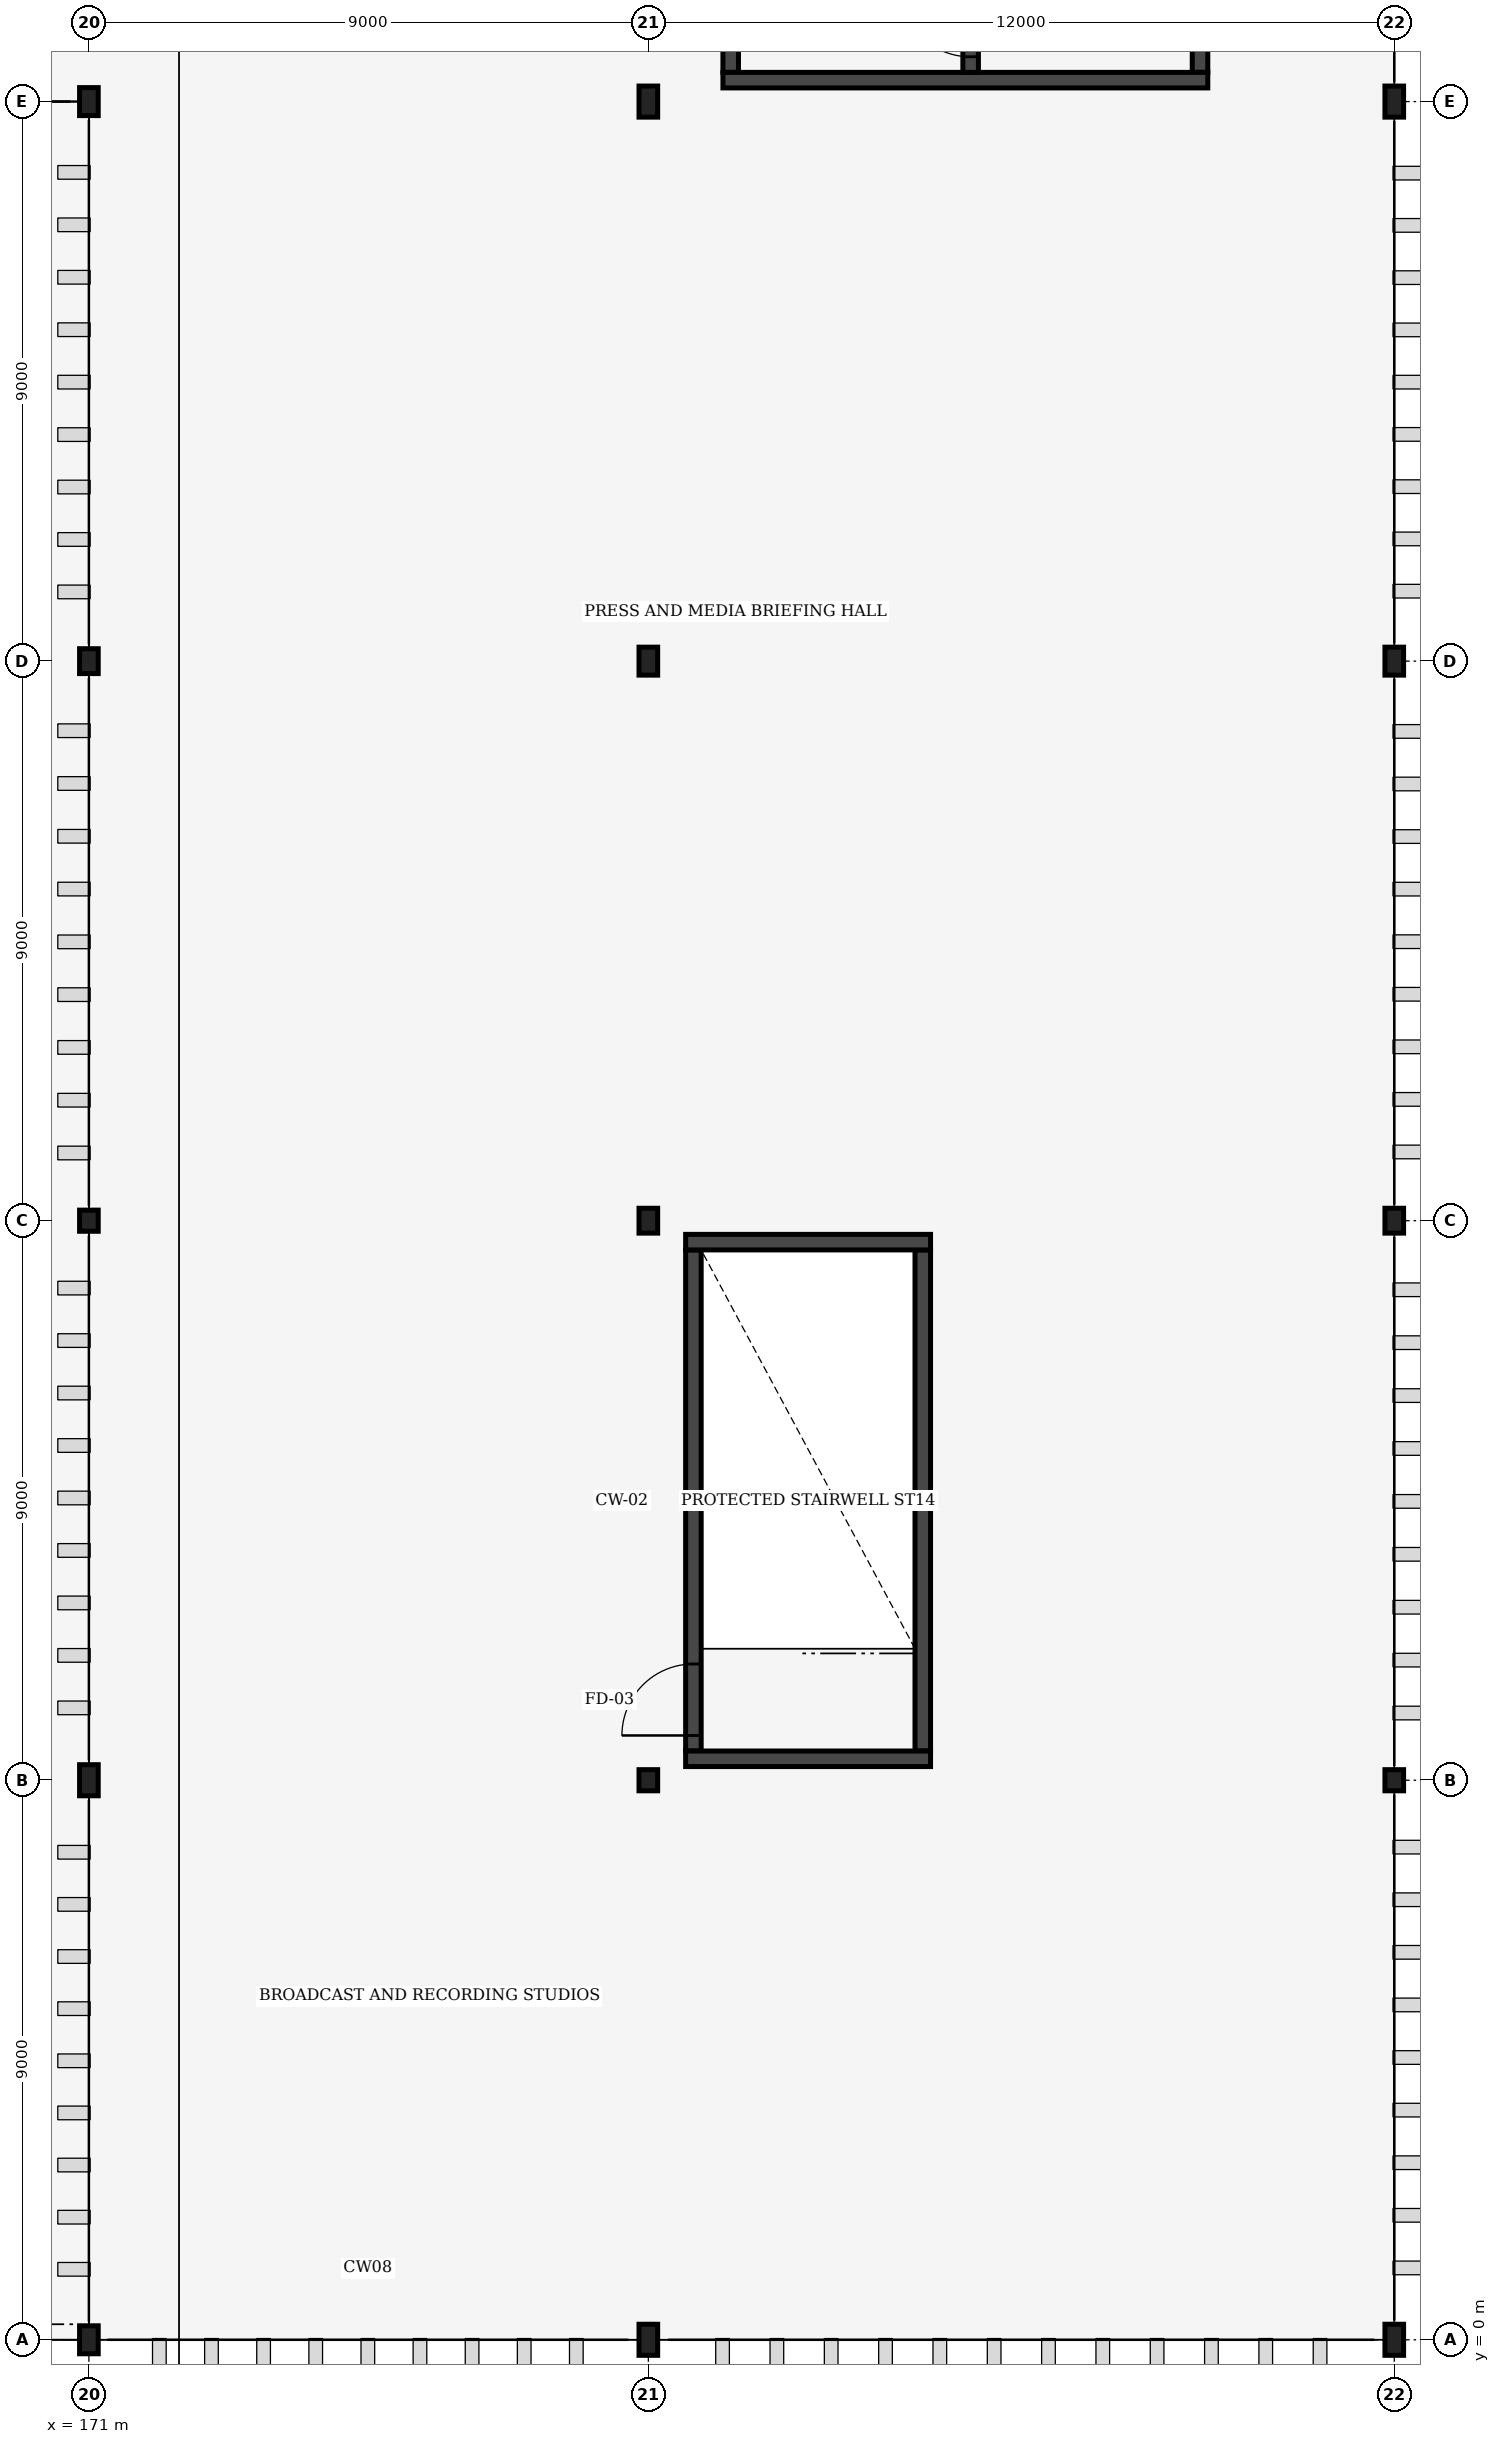
"""IFC4 building model, lengths in metres.
Left out: names, types, materials, properties, quantities, classifications, styles, units other than length and angle.
Written with IfcOpenShell. Run it as: python <this file> out.ifc"""

import sys

from ifc_helpers import new_model, si_unit, direction, frame, frame_2d, origin, origin_2d, place, context, subcontext, project, spatial, rectangle, i_section, extrude, element, fill, save


model = new_model("IFC4")
c1 = context("Model", 3, precision=1e-05, world=origin(), true_north=direction((0.0, 1.0)))
c2 = subcontext(c1, "Body", "Model", "MODEL_VIEW")
j1 = project(units=[si_unit("LENGTHUNIT", "METRE"), si_unit("PLANEANGLEUNIT", "RADIAN")], contexts=[c1])
p1 = place(None, origin())
s1 = spatial("IfcSite", under=j1, at=p1, CompositionType="ELEMENT")
p2 = place(p1, origin())
s2 = spatial("IfcBuilding", under=s1, at=p2, CompositionType="ELEMENT")
p3 = place(p2, frame((0.0, 0.0, 18.0)))
s3 = spatial("IfcBuildingStorey", under=s2, at=p3, CompositionType="ELEMENT", Elevation=18.0)
p4 = place(p3, frame((171.0, 0.0, 0.0), z_axis=(0.0, 0.0, 1.0), x_axis=(1.0, 0.0, 0.0)))
e1 = element("IfcColumn", 1, at=p4, inside=s3, PredefinedType="COLUMN", context=c2, shape_type="SweptSolid", body=[
    extrude(i_section(OverallWidth=0.3, OverallDepth=0.45, WebThickness=0.014, FlangeThickness=0.026, FilletRadius=0.027, at=origin_2d()), origin(), (0.0, 0.0, 1.0), 4.8),
])
p5 = place(p3, frame((171.0, 9.0, 0.0), z_axis=(0.0, 0.0, 1.0), x_axis=(1.0, 0.0, 0.0)))
e2 = element("IfcColumn", 2, at=p5, inside=s3, PredefinedType="COLUMN", context=c2, shape_type="SweptSolid", body=[
    extrude(i_section(OverallWidth=0.3, OverallDepth=0.5, WebThickness=0.014, FlangeThickness=0.028, FilletRadius=0.027, at=origin_2d()), origin(), (0.0, 0.0, 1.0), 4.8),
])
p6 = place(p3, frame((171.0, 18.0, 0.0), z_axis=(0.0, 0.0, 1.0), x_axis=(1.0, 0.0, 0.0)))
e3 = element("IfcColumn", 3, at=p6, inside=s3, PredefinedType="COLUMN", context=c2, shape_type="SweptSolid", body=[
    extrude(i_section(OverallWidth=0.3, OverallDepth=0.34, WebThickness=0.012, FlangeThickness=0.021, FilletRadius=0.027, at=origin_2d()), origin(), (0.0, 0.0, 1.0), 4.8),
])
p7 = place(p3, frame((171.0, 27.0, 0.0), z_axis=(0.0, 0.0, 1.0), x_axis=(1.0, 0.0, 0.0)))
e4 = element("IfcColumn", 4, at=p7, inside=s3, PredefinedType="COLUMN", context=c2, shape_type="SweptSolid", body=[
    extrude(i_section(OverallWidth=0.3, OverallDepth=0.4, WebThickness=0.013, FlangeThickness=0.024, FilletRadius=0.027, at=origin_2d()), origin(), (0.0, 0.0, 1.0), 4.8),
])
p8 = place(p3, frame((171.0, 36.0, 0.0), z_axis=(0.0, 0.0, 1.0), x_axis=(1.0, 0.0, 0.0)))
e5 = element("IfcColumn", 5, at=p8, inside=s3, PredefinedType="COLUMN", context=c2, shape_type="SweptSolid", body=[
    extrude(i_section(OverallWidth=0.3, OverallDepth=0.45, WebThickness=0.014, FlangeThickness=0.026, FilletRadius=0.027, at=origin_2d()), origin(), (0.0, 0.0, 1.0), 4.8),
])
p9 = place(p3, frame((180.0, 0.0, 0.0), z_axis=(0.0, 0.0, 1.0), x_axis=(1.0, 0.0, 0.0)))
e6 = element("IfcColumn", 6, at=p9, inside=s3, PredefinedType="COLUMN", context=c2, shape_type="SweptSolid", body=[
    extrude(i_section(OverallWidth=0.3, OverallDepth=0.5, WebThickness=0.014, FlangeThickness=0.028, FilletRadius=0.027, at=origin_2d()), origin(), (0.0, 0.0, 1.0), 4.8),
])
p10 = place(p3, frame((180.0, 9.0, 0.0), z_axis=(0.0, 0.0, 1.0), x_axis=(1.0, 0.0, 0.0)))
e7 = element("IfcColumn", 7, at=p10, inside=s3, PredefinedType="COLUMN", context=c2, shape_type="SweptSolid", body=[
    extrude(i_section(OverallWidth=0.3, OverallDepth=0.34, WebThickness=0.012, FlangeThickness=0.021, FilletRadius=0.027, at=origin_2d()), origin(), (0.0, 0.0, 1.0), 4.8),
])
p11 = place(p3, frame((180.0, 18.0, 0.0), z_axis=(0.0, 0.0, 1.0), x_axis=(1.0, 0.0, 0.0)))
e8 = element("IfcColumn", 8, at=p11, inside=s3, PredefinedType="COLUMN", context=c2, shape_type="SweptSolid", body=[
    extrude(i_section(OverallWidth=0.3, OverallDepth=0.4, WebThickness=0.013, FlangeThickness=0.024, FilletRadius=0.027, at=origin_2d()), origin(), (0.0, 0.0, 1.0), 4.8),
])
p12 = place(p3, frame((180.0, 27.0, 0.0), z_axis=(0.0, 0.0, 1.0), x_axis=(1.0, 0.0, 0.0)))
e9 = element("IfcColumn", 9, at=p12, inside=s3, PredefinedType="COLUMN", context=c2, shape_type="SweptSolid", body=[
    extrude(i_section(OverallWidth=0.3, OverallDepth=0.45, WebThickness=0.014, FlangeThickness=0.026, FilletRadius=0.027, at=origin_2d()), origin(), (0.0, 0.0, 1.0), 4.8),
])
for number, where, z_axis, x_axis in (
    (10, (180.0, 36.0, 0.0), (0.0, 0.0, 1.0), (1.0, 0.0, 0.0)),
    (11, (192.0, 0.0, 0.0), (0.0, 0.0, 1.0), (1.0, 0.0, 0.0)),
):
    element("IfcColumn", number, at=place(p3, frame(where, z_axis=z_axis, x_axis=x_axis)), inside=s3, PredefinedType="COLUMN", context=c2, shape_type="SweptSolid", body=[
        extrude(i_section(OverallWidth=0.3, OverallDepth=0.5, WebThickness=0.014, FlangeThickness=0.028, FilletRadius=0.027, at=origin_2d()), origin(), (0.0, 0.0, 1.0), 4.8),
    ])
p13 = place(p3, frame((192.0, 9.0, 0.0), z_axis=(0.0, 0.0, 1.0), x_axis=(1.0, 0.0, 0.0)))
e12 = element("IfcColumn", 12, at=p13, inside=s3, PredefinedType="COLUMN", context=c2, shape_type="SweptSolid", body=[
    extrude(i_section(OverallWidth=0.3, OverallDepth=0.34, WebThickness=0.012, FlangeThickness=0.021, FilletRadius=0.027, at=origin_2d()), origin(), (0.0, 0.0, 1.0), 4.8),
])
p14 = place(p3, frame((192.0, 18.0, 0.0), z_axis=(0.0, 0.0, 1.0), x_axis=(1.0, 0.0, 0.0)))
e13 = element("IfcColumn", 13, at=p14, inside=s3, PredefinedType="COLUMN", context=c2, shape_type="SweptSolid", body=[
    extrude(i_section(OverallWidth=0.3, OverallDepth=0.4, WebThickness=0.013, FlangeThickness=0.024, FilletRadius=0.027, at=origin_2d()), origin(), (0.0, 0.0, 1.0), 4.8),
])
p15 = place(p3, frame((192.0, 27.0, 0.0), z_axis=(0.0, 0.0, 1.0), x_axis=(1.0, 0.0, 0.0)))
e14 = element("IfcColumn", 14, at=p15, inside=s3, PredefinedType="COLUMN", context=c2, shape_type="SweptSolid", body=[
    extrude(i_section(OverallWidth=0.3, OverallDepth=0.45, WebThickness=0.014, FlangeThickness=0.026, FilletRadius=0.027, at=origin_2d()), origin(), (0.0, 0.0, 1.0), 4.8),
])
p16 = place(p3, frame((192.0, 36.0, 0.0), z_axis=(0.0, 0.0, 1.0), x_axis=(1.0, 0.0, 0.0)))
e15 = element("IfcColumn", 15, at=p16, inside=s3, PredefinedType="COLUMN", context=c2, shape_type="SweptSolid", body=[
    extrude(i_section(OverallWidth=0.3, OverallDepth=0.5, WebThickness=0.014, FlangeThickness=0.028, FilletRadius=0.027, at=origin_2d()), origin(), (0.0, 0.0, 1.0), 4.8),
])
p17 = place(p3, frame((181.325, 36.47, 0.0), z_axis=(0.0, 0.0, 1.0), x_axis=(0.0, 1.0, 0.0)))
e16 = element("IfcWall", 16, at=p17, inside=s3, PredefinedType="SHEAR", context=c2, shape_type="SweptSolid", body=[
    extrude(rectangle(XDim=8.06, YDim=0.25, at=frame_2d((4.03, 0.0))), origin(), (0.0, 0.0, 1.0), 4.45),
])
p18 = place(p17, frame((1.15, 0.0, 0.0)))
e17 = element("IfcOpeningElement", 17, at=p18, cuts=e16, PredefinedType="OPENING", context=c2, shape_type="SweptSolid", body=[
    extrude(rectangle(XDim=1.8, YDim=2.2, at=frame_2d((0.9, 1.1))), frame((0.0, 0.135, 0.0), z_axis=(0.0, -1.0, 0.0), x_axis=(1.0, 0.0, 0.0)), (0.0, 0.0, 1.0), 0.27),
])
p19 = place(p3, frame((188.875, 36.47, 0.0), z_axis=(0.0, 0.0, 1.0), x_axis=(0.0, 1.0, 0.0)))
e18 = element("IfcWall", 18, at=p19, inside=s3, PredefinedType="SHEAR", context=c2, shape_type="SweptSolid", body=[
    extrude(rectangle(XDim=8.06, YDim=0.25, at=frame_2d((4.03, 0.0))), origin(), (0.0, 0.0, 1.0), 4.45),
])
p20 = place(p3, frame((181.2, 36.345, 0.0), z_axis=(0.0, 0.0, 1.0), x_axis=(1.0, 0.0, 0.0)))
e19 = element("IfcWall", 19, at=p20, inside=s3, PredefinedType="SHEAR", context=c2, shape_type="SweptSolid", body=[
    extrude(rectangle(XDim=7.8, YDim=0.25, at=frame_2d((3.9, 0.0))), origin(), (0.0, 0.0, 1.0), 4.45),
])
p21 = place(p3, frame((185.185, 36.47, 0.0), z_axis=(0.0, 0.0, 1.0), x_axis=(0.0, 1.0, 0.0)))
e20 = element("IfcWall", 20, at=p21, inside=s3, PredefinedType="SHEAR", context=c2, shape_type="SweptSolid", body=[
    extrude(rectangle(XDim=8.06, YDim=0.25, at=frame_2d((4.03, 0.0))), origin(), (0.0, 0.0, 1.0), 4.45),
])
p22 = place(p21, frame((0.25, 0.0, 0.0)))
e21 = element("IfcOpeningElement", 21, at=p22, cuts=e20, PredefinedType="OPENING", context=c2, shape_type="SweptSolid", body=[
    extrude(rectangle(XDim=1.15, YDim=2.15, at=frame_2d((0.575, 1.075))), frame((0.0, 0.135, 0.0), z_axis=(0.0, -1.0, 0.0), x_axis=(1.0, 0.0, 0.0)), (0.0, 0.0, 1.0), 0.27),
])
p23 = place(p3, frame((180.725, 9.47, 0.0), z_axis=(0.0, 0.0, 1.0), x_axis=(0.0, 1.0, 0.0)))
e22 = element("IfcWall", 22, at=p23, inside=s3, PredefinedType="SHEAR", context=c2, shape_type="SweptSolid", body=[
    extrude(rectangle(XDim=8.06, YDim=0.25, at=frame_2d((4.03, 0.0))), origin(), (0.0, 0.0, 1.0), 4.44),
])
p24 = place(p23, frame((0.25, 0.0, 0.0)))
e23 = element("IfcOpeningElement", 23, at=p24, cuts=e22, PredefinedType="OPENING", context=c2, shape_type="SweptSolid", body=[
    extrude(rectangle(XDim=1.15, YDim=2.15, at=frame_2d((0.575, 1.075))), frame((0.0, 0.135, 0.0), z_axis=(0.0, -1.0, 0.0), x_axis=(1.0, 0.0, 0.0)), (0.0, 0.0, 1.0), 0.27),
])
p25 = place(p3, frame((184.415, 9.47, 0.0), z_axis=(0.0, 0.0, 1.0), x_axis=(0.0, 1.0, 0.0)))
e24 = element("IfcWall", 24, at=p25, inside=s3, PredefinedType="SHEAR", context=c2, shape_type="SweptSolid", body=[
    extrude(rectangle(XDim=8.06, YDim=0.25, at=frame_2d((4.03, 0.0))), origin(), (0.0, 0.0, 1.0), 4.44),
])
for number, where, z_axis, x_axis in (
    (25, (180.6, 9.345, 0.0), (0.0, 0.0, 1.0), (1.0, 0.0, 0.0)),
    (26, (180.6, 17.655, 0.0), (0.0, 0.0, 1.0), (1.0, 0.0, 0.0)),
):
    element("IfcWall", number, at=place(p3, frame(where, z_axis=z_axis, x_axis=x_axis)), inside=s3, PredefinedType="SHEAR", context=c2, shape_type="SweptSolid", body=[
        extrude(rectangle(XDim=3.94, YDim=0.25, at=frame_2d((1.97, 0.0))), origin(), (0.0, 0.0, 1.0), 4.44),
    ])
p26 = place(p22, origin())
e27 = element("IfcDoor", 27, at=p26, inside=s3, OperationType="SINGLE_SWING_RIGHT", PredefinedType="DOOR", context=c2, shape_type="SweptSolid", body=[
    extrude(rectangle(XDim=1.15, YDim=2.15, at=frame_2d((0.575, 1.075))), frame((0.0, 0.025, 0.0), z_axis=(0.0, -1.0, 0.0), x_axis=(1.0, 0.0, 0.0)), (0.0, 0.0, 1.0), 0.05),
])
fill(e21, e27)
p27 = place(p24, origin())
e28 = element("IfcDoor", 28, at=p27, inside=s3, OperationType="SINGLE_SWING_LEFT", PredefinedType="DOOR", context=c2, shape_type="SweptSolid", body=[
    extrude(rectangle(XDim=1.15, YDim=2.15, at=frame_2d((0.575, 1.075))), frame((0.0, 0.025, 0.0), z_axis=(0.0, -1.0, 0.0), x_axis=(1.0, 0.0, 0.0)), (0.0, 0.0, 1.0), 0.05),
])
fill(e23, e28)
save(model, sys.argv[1])
